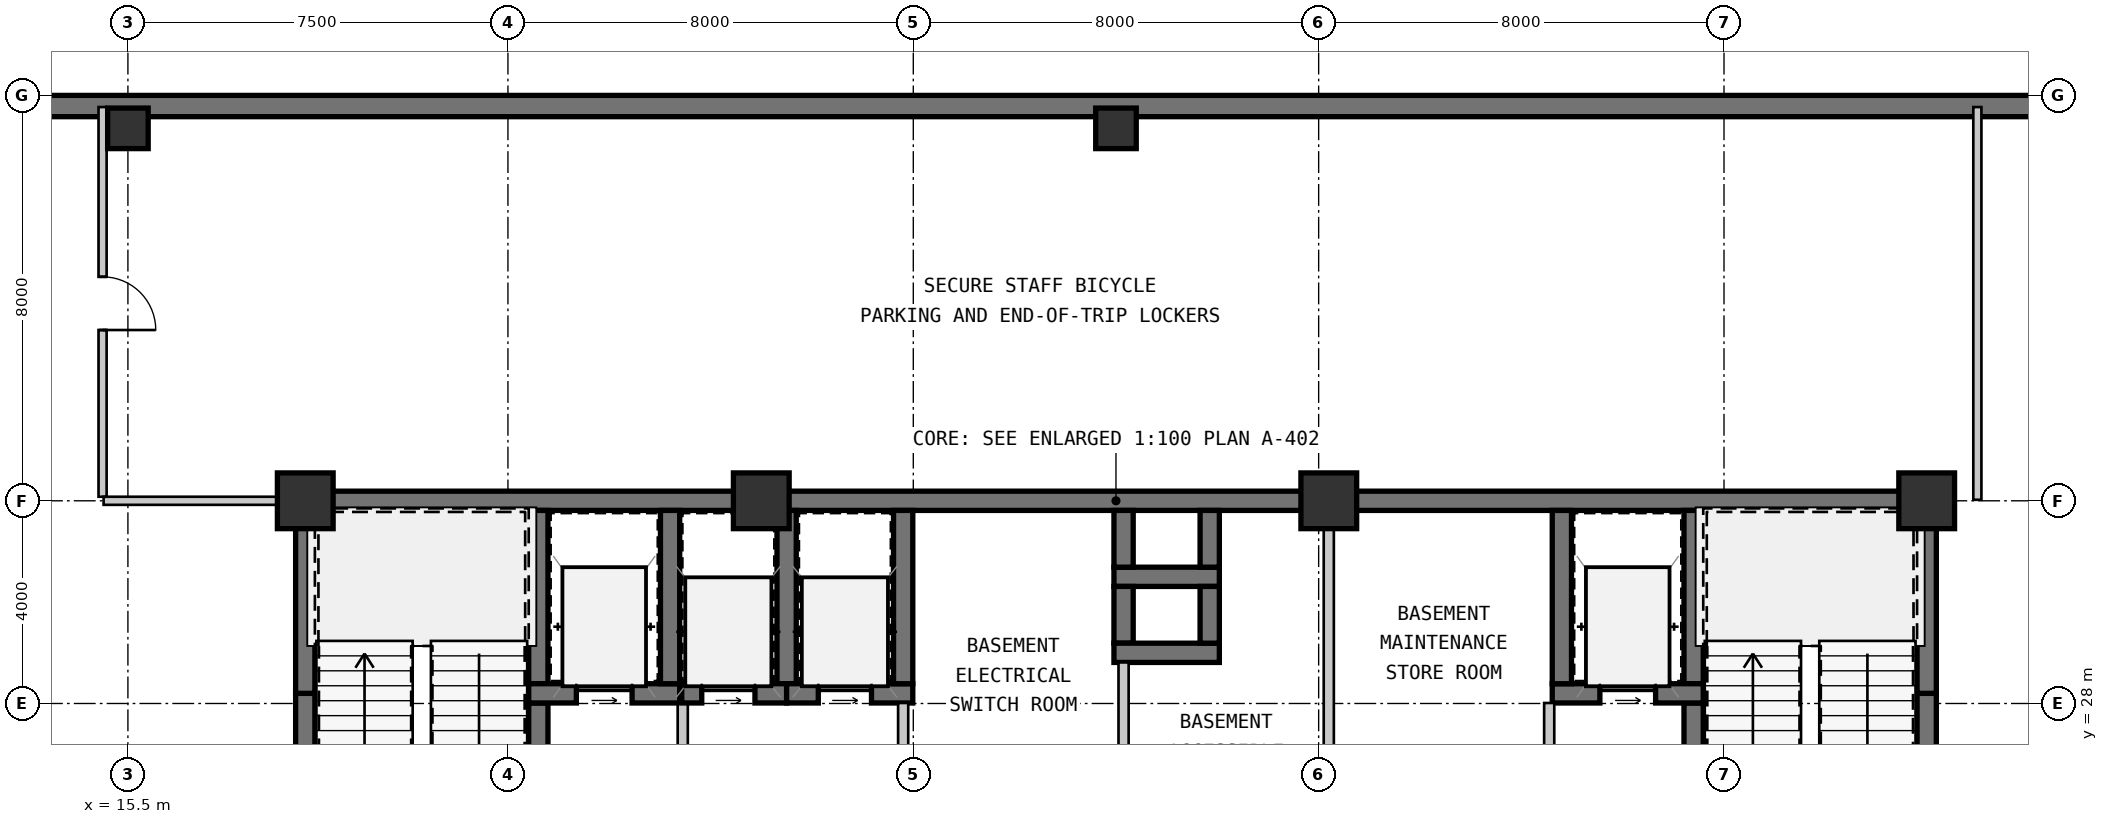
"""IFC4 building model, lengths in metres.
Left out: names, types, materials, properties, quantities, classifications, styles, units other than length and angle.
Written with IfcOpenShell. Run it as: python <this file> out.ifc"""

import sys

from ifc_helpers import new_model, si_unit, direction, frame, frame_2d, origin, origin_2d, place, context, subcontext, project, spatial, rectangle, extrude, source, transform, mapped, element, fill, save


model = new_model("IFC4")
c1 = context("Model", 3, precision=1e-05, world=origin(), true_north=direction((0.0, 1.0)))
c2 = subcontext(c1, "Body", "Model", "MODEL_VIEW")
j1 = project(units=[si_unit("LENGTHUNIT", "METRE"), si_unit("PLANEANGLEUNIT", "RADIAN")], contexts=[c1])
p1 = place(None, origin())
s1 = spatial("IfcSite", under=j1, at=p1, CompositionType="ELEMENT")
p2 = place(p1, origin())
s2 = spatial("IfcBuilding", under=s1, at=p2, CompositionType="ELEMENT")
p3 = place(p2, frame((0.0, 0.0, -4.0)))
s3 = spatial("IfcBuildingStorey", under=s2, at=p3, CompositionType="ELEMENT", Elevation=-4.0)
m1 = source(origin(), c2, "Body", "SweptSolid", [
    extrude(rectangle(XDim=1.1, YDim=1.1, at=origin_2d()), origin(), (0.0, 0.0, 1.0), 4.0),
])
for number, where, z_axis, x_axis in (
    (1, (19.0, 32.0, 0.0), (0.0, 0.0, 1.0), (1.0, 0.0, 0.0)),
    (2, (28.0, 32.0, 0.0), (0.0, 0.0, 1.0), (1.0, 0.0, 0.0)),
    (3, (39.2, 32.0, 0.0), (0.0, 0.0, 1.0), (1.0, 0.0, 0.0)),
    (4, (51.0, 32.0, 0.0), (0.0, 0.0, 1.0), (1.0, 0.0, 0.0)),
):
    element("IfcColumn", number, at=place(p3, frame(where, z_axis=z_axis, x_axis=x_axis)), inside=s3, PredefinedType="COLUMN", context=c2, shape_type="MappedRepresentation", body=[
        mapped(m1, transform((0.0, 0.0, 0.0), scale=1.0)),
    ])
m2 = source(origin(), c2, "Body", "SweptSolid", [
    extrude(rectangle(XDim=0.8, YDim=0.8, at=origin_2d()), origin(), (0.0, 0.0, 1.0), 4.0),
])
for number, where, z_axis, x_axis in (
    (5, (15.5, 39.35, 0.0), (0.0, 0.0, 1.0), (1.0, 0.0, 0.0)),
    (6, (35.0, 39.35, 0.0), (0.0, 0.0, 1.0), (1.0, 0.0, 0.0)),
):
    element("IfcColumn", number, at=place(p3, frame(where, z_axis=z_axis, x_axis=x_axis)), inside=s3, PredefinedType="COLUMN", context=c2, shape_type="MappedRepresentation", body=[
        mapped(m2, transform((0.0, 0.0, 0.0), scale=1.0)),
    ])
m3 = source(origin(), c2, "Body", "SweptSolid", [
    extrude(rectangle(XDim=69.58, YDim=0.42, at=frame_2d((34.79, 0.0))), origin(), (0.0, 0.0, 1.0), 3.74),
])
p4 = place(p3, frame((69.79, 39.79, 0.0), z_axis=(0.0, 0.0, 1.0), x_axis=(-1.0, 0.0, 0.0)))
e7 = element("IfcWall", 7, at=p4, inside=s3, PredefinedType="SOLIDWALL", context=c2, shape_type="MappedRepresentation", body=[
    mapped(m3, transform((0.0, 0.0, 0.0), scale=1.0)),
])
m4 = source(origin(), c2, "Body", "SweptSolid", [
    extrude(rectangle(XDim=9.19, YDim=0.38, at=frame_2d((4.595, 0.0))), origin(), (0.0, 0.0, 1.0), 3.74),
])
p5 = place(p3, frame((18.81, 32.0, 0.0), z_axis=(0.0, 0.0, 1.0), x_axis=(1.0, 0.0, 0.0)))
e8 = element("IfcWall", 8, at=p5, inside=s3, PredefinedType="SHEAR", context=c2, shape_type="MappedRepresentation", body=[
    mapped(m4, transform((0.0, 0.0, 0.0), scale=1.0)),
])
m5 = source(origin(), c2, "Body", "SweptSolid", [
    extrude(rectangle(XDim=11.2, YDim=0.38, at=frame_2d((5.6, 0.0))), origin(), (0.0, 0.0, 1.0), 3.74),
])
p6 = place(p3, frame((28.0, 32.0, 0.0), z_axis=(0.0, 0.0, 1.0), x_axis=(1.0, 0.0, 0.0)))
e9 = element("IfcWall", 9, at=p6, inside=s3, PredefinedType="SHEAR", context=c2, shape_type="MappedRepresentation", body=[
    mapped(m5, transform((0.0, 0.0, 0.0), scale=1.0)),
])
m6 = source(origin(), c2, "Body", "SweptSolid", [
    extrude(rectangle(XDim=11.99, YDim=0.38, at=frame_2d((5.995, 0.0))), origin(), (0.0, 0.0, 1.0), 3.74),
])
p7 = place(p3, frame((39.2, 32.0, 0.0), z_axis=(0.0, 0.0, 1.0), x_axis=(1.0, 0.0, 0.0)))
e10 = element("IfcWall", 10, at=p7, inside=s3, PredefinedType="SHEAR", context=c2, shape_type="MappedRepresentation", body=[
    mapped(m6, transform((0.0, 0.0, 0.0), scale=1.0)),
])
m7 = source(origin(), c2, "Body", "SweptSolid", [
    extrude(rectangle(XDim=4.01, YDim=0.38, at=frame_2d((2.005, 0.0))), origin(), (0.0, 0.0, 1.0), 3.74),
])
p8 = place(p3, frame((19.0, 24.19, 0.0), z_axis=(0.0, 0.0, 1.0), x_axis=(0.0, 1.0, 0.0)))
e11 = element("IfcWall", 11, at=p8, inside=s3, PredefinedType="SHEAR", context=c2, shape_type="MappedRepresentation", body=[
    mapped(m7, transform((0.0, 0.0, 0.0), scale=1.0)),
])
m8 = source(origin(), c2, "Body", "SweptSolid", [
    extrude(rectangle(XDim=3.61, YDim=0.38, at=frame_2d((1.805, 0.0))), origin(), (0.0, 0.0, 1.0), 3.74),
])
p9 = place(p3, frame((19.0, 28.2, 0.0), z_axis=(0.0, 0.0, 1.0), x_axis=(0.0, 1.0, 0.0)))
e12 = element("IfcWall", 12, at=p9, inside=s3, PredefinedType="SHEAR", context=c2, shape_type="MappedRepresentation", body=[
    mapped(m8, transform((0.0, 0.0, 0.0), scale=1.0)),
])
p10 = place(p3, frame((51.0, 24.19, 0.0), z_axis=(0.0, 0.0, 1.0), x_axis=(0.0, 1.0, 0.0)))
e13 = element("IfcWall", 13, at=p10, inside=s3, PredefinedType="SHEAR", context=c2, shape_type="MappedRepresentation", body=[
    mapped(m7, transform((0.0, 0.0, 0.0), scale=1.0)),
])
p11 = place(p3, frame((51.0, 28.2, 0.0), z_axis=(0.0, 0.0, 1.0), x_axis=(0.0, 1.0, 0.0)))
e14 = element("IfcWall", 14, at=p11, inside=s3, PredefinedType="SHEAR", context=c2, shape_type="MappedRepresentation", body=[
    mapped(m8, transform((0.0, 0.0, 0.0), scale=1.0)),
])
m9 = source(origin(), c2, "Body", "SweptSolid", [
    extrude(rectangle(XDim=3.42, YDim=0.38, at=frame_2d((1.71, 0.0))), origin(), (0.0, 0.0, 1.0), 3.74),
])
p12 = place(p3, frame((23.6, 28.39, 0.0), z_axis=(0.0, 0.0, 1.0), x_axis=(0.0, 1.0, 0.0)))
e15 = element("IfcWall", 15, at=p12, inside=s3, PredefinedType="SHEAR", context=c2, shape_type="MappedRepresentation", body=[
    mapped(m9, transform((0.0, 0.0, 0.0), scale=1.0)),
])
m10 = source(origin(), c2, "Body", "SweptSolid", [
    extrude(rectangle(XDim=3.82, YDim=0.38, at=frame_2d((1.91, 0.0))), origin(), (0.0, 0.0, 1.0), 3.74),
])
p13 = place(p3, frame((23.6, 24.19, 0.0), z_axis=(0.0, 0.0, 1.0), x_axis=(0.0, 1.0, 0.0)))
e16 = element("IfcWall", 16, at=p13, inside=s3, PredefinedType="SHEAR", context=c2, shape_type="MappedRepresentation", body=[
    mapped(m10, transform((0.0, 0.0, 0.0), scale=1.0)),
])
m11 = source(origin(), c2, "Body", "SweptSolid", [
    extrude(rectangle(XDim=1.05, YDim=2.1, at=frame_2d((0.525, 1.05))), frame((0.0, 0.2, 0.0), z_axis=(0.0, -1.0, 0.0), x_axis=(1.0, 0.0, 0.0)), (0.0, 0.0, 1.0), 0.4),
])
p14 = place(p13, frame((0.685, 0.0, 0.0)))
e17 = element("IfcOpeningElement", 17, at=p14, cuts=e16, PredefinedType="OPENING", context=c2, shape_type="MappedRepresentation", body=[
    mapped(m11, transform((0.0, 0.0, 0.0), scale=1.0)),
])
m12 = source(origin(), c2, "Body", "SweptSolid", [
    extrude(rectangle(XDim=2.98, YDim=0.38, at=frame_2d((1.49, 0.0))), origin(), (0.0, 0.0, 1.0), 3.74),
])
p15 = place(p3, frame((23.41, 28.2, 0.0), z_axis=(0.0, 0.0, 1.0), x_axis=(1.0, 0.0, 0.0)))
e18 = element("IfcWall", 18, at=p15, inside=s3, PredefinedType="SHEAR", context=c2, shape_type="MappedRepresentation", body=[
    mapped(m12, transform((0.0, 0.0, 0.0), scale=1.0)),
])
m13 = source(origin(), c2, "Body", "SweptSolid", [
    extrude(rectangle(XDim=1.1, YDim=2.15, at=frame_2d((0.55, 1.075))), frame((0.0, 0.2, 0.0), z_axis=(0.0, -1.0, 0.0), x_axis=(1.0, 0.0, 0.0)), (0.0, 0.0, 1.0), 0.4),
])
p16 = place(p15, frame((0.94, 0.0, 0.0)))
e19 = element("IfcOpeningElement", 19, at=p16, cuts=e18, PredefinedType="OPENING", context=c2, shape_type="MappedRepresentation", body=[
    mapped(m13, transform((0.0, 0.0, 0.0), scale=1.0)),
])
p17 = place(p3, frame((26.2, 28.39, 0.0), z_axis=(0.0, 0.0, 1.0), x_axis=(0.0, 1.0, 0.0)))
e20 = element("IfcWall", 20, at=p17, inside=s3, PredefinedType="SHEAR", context=c2, shape_type="MappedRepresentation", body=[
    mapped(m9, transform((0.0, 0.0, 0.0), scale=1.0)),
])
m14 = source(origin(), c2, "Body", "SweptSolid", [
    extrude(rectangle(XDim=3.91, YDim=0.2, at=frame_2d((1.955, 0.0))), origin(), (0.0, 0.0, 1.0), 3.74),
])
p18 = place(p3, frame((26.45, 24.1, 0.0), z_axis=(0.0, 0.0, 1.0), x_axis=(0.0, 1.0, 0.0)))
e21 = element("IfcWall", 21, at=p18, inside=s3, PredefinedType="SOLIDWALL", context=c2, shape_type="MappedRepresentation", body=[
    mapped(m14, transform((0.0, 0.0, 0.0), scale=1.0)),
])
p19 = place(p3, frame((46.4, 31.81, 0.0), z_axis=(0.0, 0.0, 1.0), x_axis=(0.0, -1.0, 0.0)))
e22 = element("IfcWall", 22, at=p19, inside=s3, PredefinedType="SHEAR", context=c2, shape_type="MappedRepresentation", body=[
    mapped(m9, transform((0.0, 0.0, 0.0), scale=1.0)),
])
p20 = place(p3, frame((46.4, 28.01, 0.0), z_axis=(0.0, 0.0, 1.0), x_axis=(0.0, -1.0, 0.0)))
e23 = element("IfcWall", 23, at=p20, inside=s3, PredefinedType="SHEAR", context=c2, shape_type="MappedRepresentation", body=[
    mapped(m10, transform((0.0, 0.0, 0.0), scale=1.0)),
])
p21 = place(p20, frame((2.085, 0.0, 0.0)))
e24 = element("IfcOpeningElement", 24, at=p21, cuts=e23, PredefinedType="OPENING", context=c2, shape_type="MappedRepresentation", body=[
    mapped(m11, transform((0.0, 0.0, 0.0), scale=1.0)),
])
p22 = place(p3, frame((43.61, 28.2, 0.0), z_axis=(0.0, 0.0, 1.0), x_axis=(1.0, 0.0, 0.0)))
e25 = element("IfcWall", 25, at=p22, inside=s3, PredefinedType="SHEAR", context=c2, shape_type="MappedRepresentation", body=[
    mapped(m12, transform((0.0, 0.0, 0.0), scale=1.0)),
])
p23 = place(p22, frame((0.94, 0.0, 0.0)))
e26 = element("IfcOpeningElement", 26, at=p23, cuts=e25, PredefinedType="OPENING", context=c2, shape_type="MappedRepresentation", body=[
    mapped(m13, transform((0.0, 0.0, 0.0), scale=1.0)),
])
p24 = place(p3, frame((43.8, 31.81, 0.0), z_axis=(0.0, 0.0, 1.0), x_axis=(0.0, -1.0, 0.0)))
e27 = element("IfcWall", 27, at=p24, inside=s3, PredefinedType="SHEAR", context=c2, shape_type="MappedRepresentation", body=[
    mapped(m9, transform((0.0, 0.0, 0.0), scale=1.0)),
])
p25 = place(p3, frame((43.55, 28.01, 0.0), z_axis=(0.0, 0.0, 1.0), x_axis=(0.0, -1.0, 0.0)))
e28 = element("IfcWall", 28, at=p25, inside=s3, PredefinedType="SOLIDWALL", context=c2, shape_type="MappedRepresentation", body=[
    mapped(m14, transform((0.0, 0.0, 0.0), scale=1.0)),
])
m15 = source(origin(), c2, "Body", "SweptSolid", [
    extrude(rectangle(XDim=2.08, YDim=0.38, at=frame_2d((1.04, 0.0))), origin(), (0.0, 0.0, 1.0), 3.74),
])
p26 = place(p3, frame((34.96, 30.5, 0.0), z_axis=(0.0, 0.0, 1.0), x_axis=(1.0, 0.0, 0.0)))
e29 = element("IfcWall", 29, at=p26, inside=s3, PredefinedType="SHEAR", context=c2, shape_type="MappedRepresentation", body=[
    mapped(m15, transform((0.0, 0.0, 0.0), scale=1.0)),
])
m16 = source(origin(), c2, "Body", "SweptSolid", [
    extrude(rectangle(XDim=1.12, YDim=0.38, at=frame_2d((0.56, 0.0))), origin(), (0.0, 0.0, 1.0), 3.74),
])
for number, where, z_axis, x_axis in (
    (30, (35.15, 31.81, 0.0), (0.0, 0.0, 1.0), (0.0, -1.0, 0.0)),
    (31, (36.85, 30.69, 0.0), (0.0, 0.0, 1.0), (0.0, 1.0, 0.0)),
    (32, (35.15, 30.31, 0.0), (0.0, 0.0, 1.0), (0.0, -1.0, 0.0)),
):
    element("IfcWall", number, at=place(p3, frame(where, z_axis=z_axis, x_axis=x_axis)), inside=s3, PredefinedType="SHEAR", context=c2, shape_type="MappedRepresentation", body=[
        mapped(m16, transform((0.0, 0.0, 0.0), scale=1.0)),
    ])
p27 = place(p3, frame((34.96, 29.0, 0.0), z_axis=(0.0, 0.0, 1.0), x_axis=(1.0, 0.0, 0.0)))
e33 = element("IfcWall", 33, at=p27, inside=s3, PredefinedType="SHEAR", context=c2, shape_type="MappedRepresentation", body=[
    mapped(m15, transform((0.0, 0.0, 0.0), scale=1.0)),
])
p28 = place(p3, frame((36.85, 29.19, 0.0), z_axis=(0.0, 0.0, 1.0), x_axis=(0.0, 1.0, 0.0)))
e34 = element("IfcWall", 34, at=p28, inside=s3, PredefinedType="SHEAR", context=c2, shape_type="MappedRepresentation", body=[
    mapped(m16, transform((0.0, 0.0, 0.0), scale=1.0)),
])
p29 = place(p3, frame((28.5, 28.39, 0.0), z_axis=(0.0, 0.0, 1.0), x_axis=(0.0, 1.0, 0.0)))
e35 = element("IfcWall", 35, at=p29, inside=s3, PredefinedType="SHEAR", context=c2, shape_type="MappedRepresentation", body=[
    mapped(m9, transform((0.0, 0.0, 0.0), scale=1.0)),
])
m17 = source(origin(), c2, "Body", "SweptSolid", [
    extrude(rectangle(XDim=2.07, YDim=0.38, at=frame_2d((1.035, 0.0))), origin(), (0.0, 0.0, 1.0), 3.74),
])
p30 = place(p3, frame((26.43, 28.2, 0.0), z_axis=(0.0, 0.0, 1.0), x_axis=(1.0, 0.0, 0.0)))
e36 = element("IfcWall", 36, at=p30, inside=s3, PredefinedType="SHEAR", context=c2, shape_type="MappedRepresentation", body=[
    mapped(m17, transform((0.0, 0.0, 0.0), scale=1.0)),
])
m18 = source(origin(), c2, "Body", "SweptSolid", [
    extrude(rectangle(XDim=1.05, YDim=2.15, at=frame_2d((0.525, 1.075))), frame((0.0, 0.2, 0.0), z_axis=(0.0, -1.0, 0.0), x_axis=(1.0, 0.0, 0.0)), (0.0, 0.0, 1.0), 0.4),
])
p31 = place(p30, frame((0.395, 0.0, 0.0)))
e37 = element("IfcOpeningElement", 37, at=p31, cuts=e36, PredefinedType="OPENING", context=c2, shape_type="MappedRepresentation", body=[
    mapped(m18, transform((0.0, 0.0, 0.0), scale=1.0)),
])
m19 = source(origin(), c2, "Body", "SweptSolid", [
    extrude(rectangle(XDim=2.49, YDim=0.38, at=frame_2d((1.245, 0.0))), origin(), (0.0, 0.0, 1.0), 3.74),
])
p32 = place(p3, frame((28.5, 28.2, 0.0), z_axis=(0.0, 0.0, 1.0), x_axis=(1.0, 0.0, 0.0)))
e38 = element("IfcWall", 38, at=p32, inside=s3, PredefinedType="SHEAR", context=c2, shape_type="MappedRepresentation", body=[
    mapped(m19, transform((0.0, 0.0, 0.0), scale=1.0)),
])
p33 = place(p32, frame((0.625, 0.0, 0.0)))
e39 = element("IfcOpeningElement", 39, at=p33, cuts=e38, PredefinedType="OPENING", context=c2, shape_type="MappedRepresentation", body=[
    mapped(m18, transform((0.0, 0.0, 0.0), scale=1.0)),
])
p34 = place(p3, frame((30.8, 28.39, 0.0), z_axis=(0.0, 0.0, 1.0), x_axis=(0.0, 1.0, 0.0)))
e40 = element("IfcWall", 40, at=p34, inside=s3, PredefinedType="SHEAR", context=c2, shape_type="MappedRepresentation", body=[
    mapped(m9, transform((0.0, 0.0, 0.0), scale=1.0)),
])
p35 = place(p3, frame((30.8, 28.01, 0.0), z_axis=(0.0, 0.0, 1.0), x_axis=(0.0, -1.0, 0.0)))
e41 = element("IfcWall", 41, at=p35, inside=s3, PredefinedType="SOLIDWALL", context=c2, shape_type="MappedRepresentation", body=[
    mapped(m14, transform((0.0, 0.0, 0.0), scale=1.0)),
])
m20 = source(origin(), c2, "Body", "SweptSolid", [
    extrude(rectangle(XDim=4.71, YDim=0.2, at=frame_2d((2.355, 0.0))), origin(), (0.0, 0.0, 1.0), 3.74),
])
p36 = place(p3, frame((35.15, 28.81, 0.0), z_axis=(0.0, 0.0, 1.0), x_axis=(0.0, -1.0, 0.0)))
e42 = element("IfcWall", 42, at=p36, inside=s3, PredefinedType="SOLIDWALL", context=c2, shape_type="MappedRepresentation", body=[
    mapped(m20, transform((0.0, 0.0, 0.0), scale=1.0)),
])
m21 = source(origin(), c2, "Body", "SweptSolid", [
    extrude(rectangle(XDim=7.71, YDim=0.2, at=frame_2d((3.855, 0.0))), origin(), (0.0, 0.0, 1.0), 3.28),
])
p37 = place(p3, frame((39.2, 31.81, 0.0), z_axis=(0.0, 0.0, 1.0), x_axis=(0.0, -1.0, 0.0)))
e43 = element("IfcWall", 43, at=p37, inside=s3, PredefinedType="SOLIDWALL", context=c2, shape_type="MappedRepresentation", body=[
    mapped(m21, transform((0.0, 0.0, 0.0), scale=1.0)),
])
m22 = source(origin(), c2, "Body", "SweptSolid", [
    extrude(rectangle(XDim=7.69, YDim=0.16, at=frame_2d((3.845, 0.0))), origin(), (0.0, 0.0, 1.0), 3.74),
])
p38 = place(p3, frame((15.0, 39.77, 0.0), z_axis=(0.0, 0.0, 1.0), x_axis=(0.0, -1.0, 0.0)))
e44 = element("IfcWall", 44, at=p38, inside=s3, PredefinedType="PARTITIONING", context=c2, shape_type="MappedRepresentation", body=[
    mapped(m22, transform((0.0, 0.0, 0.0), scale=1.0)),
])
m23 = source(origin(), c2, "Body", "SweptSolid", [
    extrude(rectangle(XDim=1.05, YDim=2.1, at=frame_2d((0.525, 1.05))), frame((0.0, 0.09, 0.0), z_axis=(0.0, -1.0, 0.0), x_axis=(1.0, 0.0, 0.0)), (0.0, 0.0, 1.0), 0.18),
])
p39 = place(p38, frame((3.35, 0.0, 0.0)))
e45 = element("IfcOpeningElement", 45, at=p39, cuts=e44, PredefinedType="OPENING", context=c2, shape_type="MappedRepresentation", body=[
    mapped(m23, transform((0.0, 0.0, 0.0), scale=1.0)),
])
m24 = source(origin(), c2, "Body", "SweptSolid", [
    extrude(rectangle(XDim=3.79, YDim=0.16, at=frame_2d((1.895, 0.0))), origin(), (0.0, 0.0, 1.0), 3.207),
])
p40 = place(p3, frame((15.02, 32.0, 0.0), z_axis=(0.0, 0.0, 1.0), x_axis=(1.0, 0.0, 0.0)))
e46 = element("IfcWall", 46, at=p40, inside=s3, PredefinedType="PARTITIONING", context=c2, shape_type="MappedRepresentation", body=[
    mapped(m24, transform((0.0, 0.0, 0.0), scale=1.0)),
])
m25 = source(origin(), c2, "Body", "SweptSolid", [
    extrude(rectangle(XDim=7.75, YDim=0.16, at=frame_2d((3.875, 0.0))), origin(), (0.0, 0.0, 1.0), 3.74),
])
p41 = place(p3, frame((52.0, 32.02, 0.0), z_axis=(0.0, 0.0, 1.0), x_axis=(0.0, 1.0, 0.0)))
e47 = element("IfcWall", 47, at=p41, inside=s3, PredefinedType="PARTITIONING", context=c2, shape_type="MappedRepresentation", body=[
    mapped(m25, transform((0.0, 0.0, 0.0), scale=1.0)),
])
m26 = source(origin(), c2, "Body", "SweptSolid", [
    extrude(rectangle(XDim=1.1, YDim=2.15, at=frame_2d((0.55, 1.075))), frame((0.0, 0.025, 0.0), z_axis=(0.0, -1.0, 0.0), x_axis=(1.0, 0.0, 0.0)), (0.0, 0.0, 1.0), 0.05),
])
p42 = place(p16, origin())
e48 = element("IfcDoor", 48, at=p42, inside=s3, OperationType="SLIDING_TO_LEFT", PredefinedType="DOOR", context=c2, shape_type="MappedRepresentation", body=[
    mapped(m26, transform((0.0, 0.0, 0.0), scale=1.0)),
])
fill(e19, e48)
p43 = place(p23, origin())
e49 = element("IfcDoor", 49, at=p43, inside=s3, OperationType="SLIDING_TO_LEFT", PredefinedType="DOOR", context=c2, shape_type="MappedRepresentation", body=[
    mapped(m26, transform((0.0, 0.0, 0.0), scale=1.0)),
])
fill(e26, e49)
m27 = source(origin(), c2, "Body", "SweptSolid", [
    extrude(rectangle(XDim=1.05, YDim=2.15, at=frame_2d((0.525, 1.075))), frame((0.0, 0.025, 0.0), z_axis=(0.0, -1.0, 0.0), x_axis=(1.0, 0.0, 0.0)), (0.0, 0.0, 1.0), 0.05),
])
p44 = place(p31, origin())
e50 = element("IfcDoor", 50, at=p44, inside=s3, OperationType="SLIDING_TO_LEFT", PredefinedType="DOOR", context=c2, shape_type="MappedRepresentation", body=[
    mapped(m27, transform((0.0, 0.0, 0.0), scale=1.0)),
])
fill(e37, e50)
p45 = place(p33, origin())
e51 = element("IfcDoor", 51, at=p45, inside=s3, OperationType="SLIDING_TO_LEFT", PredefinedType="DOOR", context=c2, shape_type="MappedRepresentation", body=[
    mapped(m27, transform((0.0, 0.0, 0.0), scale=1.0)),
])
fill(e39, e51)
m28 = source(origin(), c2, "Body", "SweptSolid", [
    extrude(rectangle(XDim=1.05, YDim=2.1, at=frame_2d((0.525, 1.05))), frame((0.0, 0.025, 0.0), z_axis=(0.0, -1.0, 0.0), x_axis=(1.0, 0.0, 0.0)), (0.0, 0.0, 1.0), 0.05),
])
p46 = place(p39, origin())
e52 = element("IfcDoor", 52, at=p46, inside=s3, OperationType="SINGLE_SWING_RIGHT", PredefinedType="DOOR", context=c2, shape_type="MappedRepresentation", body=[
    mapped(m28, transform((0.0, 0.0, 0.0), scale=1.0)),
])
fill(e45, e52)
save(model, sys.argv[1])
